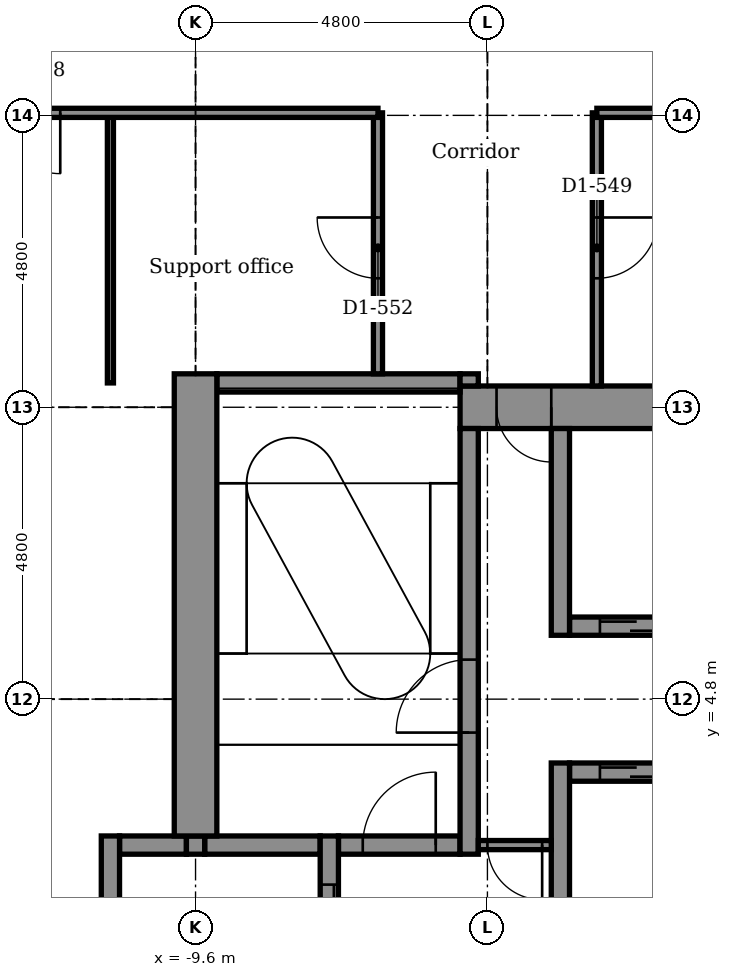
"""IFC4 building model, lengths in metres.
Left out: names, types, materials, properties, quantities, classifications, styles, units other than length and angle.
Written with IfcOpenShell. Run it as: python <this file> out.ifc"""

import sys

from ifc_helpers import new_model, si_unit, direction, frame, frame_2d, origin, place, context, subcontext, project, spatial, rectangle, extrude, element, fill, save


model = new_model("IFC4")
c1 = context("Model", 3, precision=1e-05, world=origin(), true_north=direction((0.0, 1.0)))
c2 = subcontext(c1, "Body", "Model", "MODEL_VIEW")
j1 = project(units=[si_unit("LENGTHUNIT", "METRE"), si_unit("PLANEANGLEUNIT", "RADIAN")], contexts=[c1])
p1 = place(None, origin())
s1 = spatial("IfcSite", under=j1, at=p1, CompositionType="ELEMENT")
p2 = place(p1, origin())
s2 = spatial("IfcBuilding", under=s1, at=p2, CompositionType="ELEMENT")
p3 = place(p2, frame((0.0, 0.0, 197.3)))
s3 = spatial("IfcBuildingStorey", under=s2, at=p3, CompositionType="ELEMENT", Elevation=197.3)
p4 = place(p3, frame((-10.85, 2.4, -0.15), z_axis=(0.0, 0.0, 1.0), x_axis=(1.0, 0.0, 0.0)))
e1 = element("IfcWall", 1, at=p4, inside=s3, PredefinedType="STANDARD", context=c2, shape_type="SweptSolid", body=[
    extrude(rectangle(XDim=1.1, YDim=0.3, at=frame_2d((0.55, 0.0))), origin(), (0.0, 0.0, 1.0), 3.9),
])
p5 = place(p3, frame((-9.45, 2.4, -0.15), z_axis=(0.0, 0.0, 1.0), x_axis=(1.0, 0.0, 0.0)))
e2 = element("IfcWall", 2, at=p5, inside=s3, PredefinedType="STANDARD", context=c2, shape_type="SweptSolid", body=[
    extrude(rectangle(XDim=1.9, YDim=0.3, at=frame_2d((0.95, 0.0))), origin(), (0.0, 0.0, 1.0), 3.9),
])
p6 = place(p3, frame((-7.25, 2.4, -0.15), z_axis=(0.0, 0.0, 1.0), x_axis=(1.0, 0.0, 0.0)))
e3 = element("IfcWall", 3, at=p6, inside=s3, PredefinedType="STANDARD", context=c2, shape_type="SweptSolid", body=[
    extrude(rectangle(XDim=2.0, YDim=0.3, at=frame_2d((1.0, 0.0))), origin(), (0.0, 0.0, 1.0), 3.9),
])
p7 = place(p6, frame((0.4, 0.0, 0.15)))
e4 = element("IfcOpeningElement", 4, at=p7, cuts=e3, PredefinedType="OPENING", context=c2, shape_type="SweptSolid", body=[
    extrude(rectangle(XDim=1.2, YDim=2.1, at=frame_2d((0.6, 1.05))), frame((0.0, 0.16, 0.0), z_axis=(0.0, -1.0, 0.0), x_axis=(1.0, 0.0, 0.0)), (0.0, 0.0, 1.0), 0.32),
])
p8 = place(p3, frame((-3.45, 3.6, -0.15), z_axis=(0.0, 0.0, 1.0), x_axis=(1.0, 0.0, 0.0)))
e5 = element("IfcWall", 5, at=p8, inside=s3, PredefinedType="STANDARD", context=c2, shape_type="SweptSolid", body=[
    extrude(rectangle(XDim=2.1, YDim=0.3, at=frame_2d((1.05, 0.0))), origin(), (0.0, 0.0, 1.0), 3.9),
])
p9 = place(p8, frame((0.5, 0.0, 0.15)))
e6 = element("IfcOpeningElement", 6, at=p9, cuts=e5, PredefinedType="OPENING", context=c2, shape_type="SweptSolid", body=[
    extrude(rectangle(XDim=1.1, YDim=2.1, at=frame_2d((0.55, 1.05))), frame((0.0, 0.16, 0.0), z_axis=(0.0, -1.0, 0.0), x_axis=(1.0, 0.0, 0.0)), (0.0, 0.0, 1.0), 0.32),
])
p10 = place(p3, frame((-3.45, 6.0, -0.15), z_axis=(0.0, 0.0, 1.0), x_axis=(1.0, 0.0, 0.0)))
e7 = element("IfcWall", 7, at=p10, inside=s3, PredefinedType="STANDARD", context=c2, shape_type="SweptSolid", body=[
    extrude(rectangle(XDim=2.1, YDim=0.3, at=frame_2d((1.05, 0.0))), origin(), (0.0, 0.0, 1.0), 3.9),
])
p11 = place(p10, frame((0.5, 0.0, 0.15)))
e8 = element("IfcOpeningElement", 8, at=p11, cuts=e7, PredefinedType="OPENING", context=c2, shape_type="SweptSolid", body=[
    extrude(rectangle(XDim=1.1, YDim=2.1, at=frame_2d((0.55, 1.05))), frame((0.0, 0.16, 0.0), z_axis=(0.0, -1.0, 0.0), x_axis=(1.0, 0.0, 0.0)), (0.0, 0.0, 1.0), 0.32),
])
p12 = place(p3, frame((-5.25, 9.6, -0.15), z_axis=(0.0, 0.0, 1.0), x_axis=(1.0, 0.0, 0.0)))
e9 = element("IfcWall", 9, at=p12, inside=s3, PredefinedType="SHEAR", context=c2, shape_type="SweptSolid", body=[
    extrude(rectangle(XDim=14.5, YDim=0.7, at=frame_2d((7.25, 0.0))), origin(), (0.0, 0.0, 1.0), 3.9),
])
p13 = place(p12, frame((0.6, 0.0, 0.15)))
e10 = element("IfcOpeningElement", 10, at=p13, cuts=e9, PredefinedType="OPENING", context=c2, shape_type="SweptSolid", body=[
    extrude(rectangle(XDim=0.9, YDim=2.1, at=frame_2d((0.45, 1.05))), frame((0.0, 0.36, 0.0), z_axis=(0.0, -1.0, 0.0), x_axis=(1.0, 0.0, 0.0)), (0.0, 0.0, 1.0), 0.72),
])
p14 = place(p3, frame((-9.25, 10.0, -0.15), z_axis=(0.0, 0.0, 1.0), x_axis=(1.0, 0.0, 0.0)))
e11 = element("IfcWall", 11, at=p14, inside=s3, PredefinedType="STANDARD", context=c2, shape_type="SweptSolid", body=[
    extrude(rectangle(XDim=4.0, YDim=0.3, at=frame_2d((2.0, 0.0))), origin(), (0.0, 0.0, 1.0), 3.9),
])
p15 = place(p3, frame((-11.0, -2.55, -0.15), z_axis=(0.0, 0.0, 1.0), x_axis=(0.0, 1.0, 0.0)))
e12 = element("IfcWall", 12, at=p15, inside=s3, PredefinedType="STANDARD", context=c2, shape_type="SweptSolid", body=[
    extrude(rectangle(XDim=5.1, YDim=0.3, at=frame_2d((2.55, 0.0))), origin(), (0.0, 0.0, 1.0), 3.9),
])
p16 = place(p3, frame((-9.6, 2.25, -0.15), z_axis=(0.0, 0.0, 1.0), x_axis=(0.0, 1.0, 0.0)))
e13 = element("IfcWall", 13, at=p16, inside=s3, PredefinedType="STANDARD", context=c2, shape_type="SweptSolid", body=[
    extrude(rectangle(XDim=0.3, YDim=0.3, at=frame_2d((0.15, 0.0))), origin(), (0.0, 0.0, 1.0), 3.9),
])
p17 = place(p3, frame((-9.6, 2.55, -0.15), z_axis=(0.0, 0.0, 1.0), x_axis=(0.0, 1.0, 0.0)))
e14 = element("IfcWall", 14, at=p17, inside=s3, PredefinedType="SHEAR", context=c2, shape_type="SweptSolid", body=[
    extrude(rectangle(XDim=7.6, YDim=0.7, at=frame_2d((3.8, 0.0))), origin(), (0.0, 0.0, 1.0), 3.9),
])
p18 = place(p3, frame((-7.4, -2.55, -0.15), z_axis=(0.0, 0.0, 1.0), x_axis=(0.0, 1.0, 0.0)))
e15 = element("IfcWall", 15, at=p18, inside=s3, PredefinedType="STANDARD", context=c2, shape_type="SweptSolid", body=[
    extrude(rectangle(XDim=5.1, YDim=0.3, at=frame_2d((2.55, 0.0))), origin(), (0.0, 0.0, 1.0), 3.9),
])
p19 = place(p18, frame((0.8, 0.0, 0.15)))
e16 = element("IfcOpeningElement", 16, at=p19, cuts=e15, PredefinedType="OPENING", context=c2, shape_type="SweptSolid", body=[
    extrude(rectangle(XDim=1.1, YDim=2.1, at=frame_2d((0.55, 1.05))), frame((0.0, 0.16, 0.0), z_axis=(0.0, -1.0, 0.0), x_axis=(1.0, 0.0, 0.0)), (0.0, 0.0, 1.0), 0.32),
])
p20 = place(p18, frame((3.2, 0.0, 0.15)))
e17 = element("IfcOpeningElement", 17, at=p20, cuts=e15, PredefinedType="OPENING", context=c2, shape_type="SweptSolid", body=[
    extrude(rectangle(XDim=1.1, YDim=2.1, at=frame_2d((0.55, 1.05))), frame((0.0, 0.16, 0.0), z_axis=(0.0, -1.0, 0.0), x_axis=(1.0, 0.0, 0.0)), (0.0, 0.0, 1.0), 0.32),
])
p21 = place(p3, frame((-5.1, 2.25, -0.15), z_axis=(0.0, 0.0, 1.0), x_axis=(0.0, 1.0, 0.0)))
e18 = element("IfcWall", 18, at=p21, inside=s3, PredefinedType="STANDARD", context=c2, shape_type="SweptSolid", body=[
    extrude(rectangle(XDim=7.0, YDim=0.3, at=frame_2d((3.5, 0.0))), origin(), (0.0, 0.0, 1.0), 3.9),
])
p22 = place(p21, frame((2.0, 0.0, 0.15)))
e19 = element("IfcOpeningElement", 19, at=p22, cuts=e18, PredefinedType="OPENING", context=c2, shape_type="SweptSolid", body=[
    extrude(rectangle(XDim=1.2, YDim=2.1, at=frame_2d((0.6, 1.05))), frame((0.0, 0.16, 0.0), z_axis=(0.0, -1.0, 0.0), x_axis=(1.0, 0.0, 0.0)), (0.0, 0.0, 1.0), 0.32),
])
p23 = place(p3, frame((-5.1, 9.95, -0.15), z_axis=(0.0, 0.0, 1.0), x_axis=(0.0, 1.0, 0.0)))
e20 = element("IfcWall", 20, at=p23, inside=s3, PredefinedType="STANDARD", context=c2, shape_type="SweptSolid", body=[
    extrude(rectangle(XDim=0.2, YDim=0.3, at=frame_2d((0.1, 0.0))), origin(), (0.0, 0.0, 1.0), 3.9),
])
p24 = place(p3, frame((-3.6, -3.75, -0.15), z_axis=(0.0, 0.0, 1.0), x_axis=(0.0, 1.0, 0.0)))
e21 = element("IfcWall", 21, at=p24, inside=s3, PredefinedType="STANDARD", context=c2, shape_type="SweptSolid", body=[
    extrude(rectangle(XDim=7.5, YDim=0.3, at=frame_2d((3.75, 0.0))), origin(), (0.0, 0.0, 1.0), 3.9),
])
p25 = place(p3, frame((-3.6, 5.85, -0.15), z_axis=(0.0, 0.0, 1.0), x_axis=(0.0, 1.0, 0.0)))
e22 = element("IfcWall", 22, at=p25, inside=s3, PredefinedType="STANDARD", context=c2, shape_type="SweptSolid", body=[
    extrude(rectangle(XDim=3.4, YDim=0.3, at=frame_2d((1.7, 0.0))), origin(), (0.0, 0.0, 1.0), 3.9),
])
p26 = place(p3, frame((-3.0, 9.95, 0.0), z_axis=(0.0, 0.0, 1.0), x_axis=(0.0, 1.0, 0.0)))
e23 = element("IfcWall", 23, at=p26, inside=s3, PredefinedType="PARTITIONING", context=c2, shape_type="SweptSolid", body=[
    extrude(rectangle(XDim=4.491, YDim=0.15, at=frame_2d((2.246, 0.0))), origin(), (0.0, 0.0, 1.0), 3.75),
])
p27 = place(p26, frame((1.771, 0.0, 0.0)))
e24 = element("IfcOpeningElement", 24, at=p27, cuts=e23, PredefinedType="OPENING", context=c2, shape_type="SweptSolid", body=[
    extrude(rectangle(XDim=1.0, YDim=2.1, at=frame_2d((0.5, 1.05))), frame((0.0, 0.085, 0.0), z_axis=(0.0, -1.0, 0.0), x_axis=(1.0, 0.0, 0.0)), (0.0, 0.0, 1.0), 0.17),
])
p28 = place(p3, frame((-6.6, 10.15, 0.0), z_axis=(0.0, 0.0, 1.0), x_axis=(0.0, 1.0, 0.0)))
e25 = element("IfcWall", 25, at=p28, inside=s3, PredefinedType="PARTITIONING", context=c2, shape_type="SweptSolid", body=[
    extrude(rectangle(XDim=4.292, YDim=0.15, at=frame_2d((2.146, 0.0))), origin(), (0.0, 0.0, 1.0), 3.75),
])
p29 = place(p28, frame((1.571, 0.0, 0.0)))
e26 = element("IfcOpeningElement", 26, at=p29, cuts=e25, PredefinedType="OPENING", context=c2, shape_type="SweptSolid", body=[
    extrude(rectangle(XDim=1.0, YDim=2.1, at=frame_2d((0.5, 1.05))), frame((0.0, 0.085, 0.0), z_axis=(0.0, -1.0, 0.0), x_axis=(1.0, 0.0, 0.0)), (0.0, 0.0, 1.0), 0.17),
])
p30 = place(p3, frame((-11.0, 10.0, 0.0), z_axis=(0.0, 0.0, 1.0), x_axis=(0.0, 1.0, 0.0)))
e27 = element("IfcWall", 27, at=p30, inside=s3, PredefinedType="PARTITIONING", context=c2, shape_type="SweptSolid", body=[
    extrude(rectangle(XDim=4.441, YDim=0.1, at=frame_2d((2.221, 0.0))), origin(), (0.0, 0.0, 1.0), 3.75),
])
p31 = place(p3, frame((-18.592, 14.441, 0.0), z_axis=(0.0, 0.0, 1.0), x_axis=(1.0, 0.0, 0.0)))
e28 = element("IfcWall", 28, at=p31, inside=s3, PredefinedType="PARTITIONING", context=c2, shape_type="SweptSolid", body=[
    extrude(rectangle(XDim=11.991, YDim=0.15, at=frame_2d((5.996, 0.0))), origin(), (0.0, 0.0, 1.0), 3.75),
])
p32 = place(p31, frame((5.767, 0.0, 0.0)))
e29 = element("IfcOpeningElement", 29, at=p32, cuts=e28, PredefinedType="OPENING", context=c2, shape_type="SweptSolid", body=[
    extrude(rectangle(XDim=1.0, YDim=2.1, at=frame_2d((0.5, 1.05))), frame((0.0, 0.085, 0.0), z_axis=(0.0, -1.0, 0.0), x_axis=(1.0, 0.0, 0.0)), (0.0, 0.0, 1.0), 0.17),
])
p33 = place(p3, frame((-3.0, 14.441, 0.0), z_axis=(0.0, 0.0, 1.0), x_axis=(1.0, 0.0, 0.0)))
e30 = element("IfcWall", 30, at=p33, inside=s3, PredefinedType="PARTITIONING", context=c2, shape_type="SweptSolid", body=[
    extrude(rectangle(XDim=19.843, YDim=0.15, at=frame_2d((9.921, 0.0))), origin(), (0.0, 0.0, 1.0), 3.75),
])
p34 = place(p33, frame((4.9, 0.0, 0.0)))
e31 = element("IfcOpeningElement", 31, at=p34, cuts=e30, PredefinedType="OPENING", context=c2, shape_type="SweptSolid", body=[
    extrude(rectangle(XDim=1.0, YDim=2.1, at=frame_2d((0.5, 1.05))), frame((0.0, 0.085, 0.0), z_axis=(0.0, -1.0, 0.0), x_axis=(1.0, 0.0, 0.0)), (0.0, 0.0, 1.0), 0.17),
])
p35 = place(p33, frame((9.7, 0.0, 0.0)))
e32 = element("IfcOpeningElement", 32, at=p35, cuts=e30, PredefinedType="OPENING", context=c2, shape_type="SweptSolid", body=[
    extrude(rectangle(XDim=1.0, YDim=2.1, at=frame_2d((0.5, 1.05))), frame((0.0, 0.085, 0.0), z_axis=(0.0, -1.0, 0.0), x_axis=(1.0, 0.0, 0.0)), (0.0, 0.0, 1.0), 0.17),
])
p36 = place(p33, frame((13.175, 0.0, 0.0)))
e33 = element("IfcOpeningElement", 33, at=p36, cuts=e30, PredefinedType="OPENING", context=c2, shape_type="SweptSolid", body=[
    extrude(rectangle(XDim=1.0, YDim=2.1, at=frame_2d((0.5, 1.05))), frame((0.0, 0.085, 0.0), z_axis=(0.0, -1.0, 0.0), x_axis=(1.0, 0.0, 0.0)), (0.0, 0.0, 1.0), 0.17),
])
p37 = place(p33, frame((15.771, 0.0, 0.0)))
e34 = element("IfcOpeningElement", 34, at=p37, cuts=e30, PredefinedType="OPENING", context=c2, shape_type="SweptSolid", body=[
    extrude(rectangle(XDim=1.8, YDim=2.1, at=frame_2d((0.9, 1.05))), frame((0.0, 0.085, 0.0), z_axis=(0.0, -1.0, 0.0), x_axis=(1.0, 0.0, 0.0)), (0.0, 0.0, 1.0), 0.17),
])
p38 = place(p3, frame((-4.95, 2.4, 0.0), z_axis=(0.0, 0.0, 1.0), x_axis=(1.0, 0.0, 0.0)))
e35 = element("IfcWall", 35, at=p38, inside=s3, PredefinedType="PARTITIONING", context=c2, shape_type="SweptSolid", body=[
    extrude(rectangle(XDim=1.2, YDim=0.15, at=frame_2d((0.6, 0.0))), origin(), (0.0, 0.0, 1.0), 3.75),
])
p39 = place(p38, frame((0.15, 0.0, 0.0)))
e36 = element("IfcOpeningElement", 36, at=p39, cuts=e35, PredefinedType="OPENING", context=c2, shape_type="SweptSolid", body=[
    extrude(rectangle(XDim=0.9, YDim=2.1, at=frame_2d((0.45, 1.05))), frame((0.0, 0.085, 0.0), z_axis=(0.0, -1.0, 0.0), x_axis=(1.0, 0.0, 0.0)), (0.0, 0.0, 1.0), 0.17),
])
p40 = place(p27, frame((1.0, 0.0, 0.0), z_axis=(0.0, 0.0, 1.0), x_axis=(-1.0, 0.0, 0.0)))
e37 = element("IfcDoor", 37, at=p40, inside=s3, OperationType="SINGLE_SWING_RIGHT", PredefinedType="DOOR", context=c2, shape_type="SweptSolid", body=[
    extrude(rectangle(XDim=1.0, YDim=2.1, at=frame_2d((0.5, 1.05))), frame((0.0, 0.025, 0.0), z_axis=(0.0, -1.0, 0.0), x_axis=(1.0, 0.0, 0.0)), (0.0, 0.0, 1.0), 0.05),
])
fill(e24, e37)
p41 = place(p29, origin())
e38 = element("IfcDoor", 38, at=p41, inside=s3, OperationType="SINGLE_SWING_RIGHT", PredefinedType="DOOR", context=c2, shape_type="SweptSolid", body=[
    extrude(rectangle(XDim=1.0, YDim=2.1, at=frame_2d((0.5, 1.05))), frame((0.0, 0.025, 0.0), z_axis=(0.0, -1.0, 0.0), x_axis=(1.0, 0.0, 0.0)), (0.0, 0.0, 1.0), 0.05),
])
fill(e26, e38)
p42 = place(p32, frame((1.0, 0.0, 0.0), z_axis=(0.0, 0.0, 1.0), x_axis=(-1.0, 0.0, 0.0)))
e39 = element("IfcDoor", 39, at=p42, inside=s3, OperationType="SINGLE_SWING_RIGHT", PredefinedType="DOOR", context=c2, shape_type="SweptSolid", body=[
    extrude(rectangle(XDim=1.0, YDim=2.1, at=frame_2d((0.5, 1.05))), frame((0.0, 0.025, 0.0), z_axis=(0.0, -1.0, 0.0), x_axis=(1.0, 0.0, 0.0)), (0.0, 0.0, 1.0), 0.05),
])
fill(e29, e39)
p43 = place(p20, origin())
e40 = element("IfcDoor", 40, at=p43, inside=s3, OperationType="DOUBLE_DOOR_SLIDING", PredefinedType="DOOR", context=c2, shape_type="SweptSolid", body=[
    extrude(rectangle(XDim=1.1, YDim=2.1, at=frame_2d((0.55, 1.05))), frame((0.0, 0.025, 0.0), z_axis=(0.0, -1.0, 0.0), x_axis=(1.0, 0.0, 0.0)), (0.0, 0.0, 1.0), 0.05),
])
fill(e17, e40)
p44 = place(p11, origin())
e41 = element("IfcDoor", 41, at=p44, inside=s3, OperationType="DOUBLE_DOOR_SLIDING", PredefinedType="DOOR", context=c2, shape_type="SweptSolid", body=[
    extrude(rectangle(XDim=1.1, YDim=2.1, at=frame_2d((0.55, 1.05))), frame((0.0, 0.025, 0.0), z_axis=(0.0, -1.0, 0.0), x_axis=(1.0, 0.0, 0.0)), (0.0, 0.0, 1.0), 0.05),
])
fill(e8, e41)
p45 = place(p9, origin())
e42 = element("IfcDoor", 42, at=p45, inside=s3, OperationType="DOUBLE_DOOR_SLIDING", PredefinedType="DOOR", context=c2, shape_type="SweptSolid", body=[
    extrude(rectangle(XDim=1.1, YDim=2.1, at=frame_2d((0.55, 1.05))), frame((0.0, 0.025, 0.0), z_axis=(0.0, -1.0, 0.0), x_axis=(1.0, 0.0, 0.0)), (0.0, 0.0, 1.0), 0.05),
])
fill(e6, e42)
p46 = place(p22, origin())
e43 = element("IfcDoor", 43, at=p46, inside=s3, OperationType="SINGLE_SWING_LEFT", PredefinedType="DOOR", context=c2, shape_type="SweptSolid", body=[
    extrude(rectangle(XDim=1.2, YDim=2.1, at=frame_2d((0.6, 1.05))), frame((0.0, 0.025, 0.0), z_axis=(0.0, -1.0, 0.0), x_axis=(1.0, 0.0, 0.0)), (0.0, 0.0, 1.0), 0.05),
])
fill(e19, e43)
p47 = place(p13, frame((0.9, 0.0, 0.0), z_axis=(0.0, 0.0, 1.0), x_axis=(-1.0, 0.0, 0.0)))
e44 = element("IfcDoor", 44, at=p47, inside=s3, OperationType="SINGLE_SWING_RIGHT", PredefinedType="DOOR", context=c2, shape_type="SweptSolid", body=[
    extrude(rectangle(XDim=0.9, YDim=2.1, at=frame_2d((0.45, 1.05))), frame((0.0, 0.025, 0.0), z_axis=(0.0, -1.0, 0.0), x_axis=(1.0, 0.0, 0.0)), (0.0, 0.0, 1.0), 0.05),
])
fill(e10, e44)
p48 = place(p39, frame((0.9, 0.0, 0.0), z_axis=(0.0, 0.0, 1.0), x_axis=(-1.0, 0.0, 0.0)))
e45 = element("IfcDoor", 45, at=p48, inside=s3, OperationType="SINGLE_SWING_RIGHT", PredefinedType="DOOR", context=c2, shape_type="SweptSolid", body=[
    extrude(rectangle(XDim=0.9, YDim=2.1, at=frame_2d((0.45, 1.05))), frame((0.0, 0.025, 0.0), z_axis=(0.0, -1.0, 0.0), x_axis=(1.0, 0.0, 0.0)), (0.0, 0.0, 1.0), 0.05),
])
fill(e36, e45)
p49 = place(p7, origin())
e46 = element("IfcDoor", 46, at=p49, inside=s3, OperationType="SINGLE_SWING_RIGHT", PredefinedType="DOOR", context=c2, shape_type="SweptSolid", body=[
    extrude(rectangle(XDim=1.2, YDim=2.1, at=frame_2d((0.6, 1.05))), frame((0.0, 0.025, 0.0), z_axis=(0.0, -1.0, 0.0), x_axis=(1.0, 0.0, 0.0)), (0.0, 0.0, 1.0), 0.05),
])
fill(e4, e46)
save(model, sys.argv[1])
